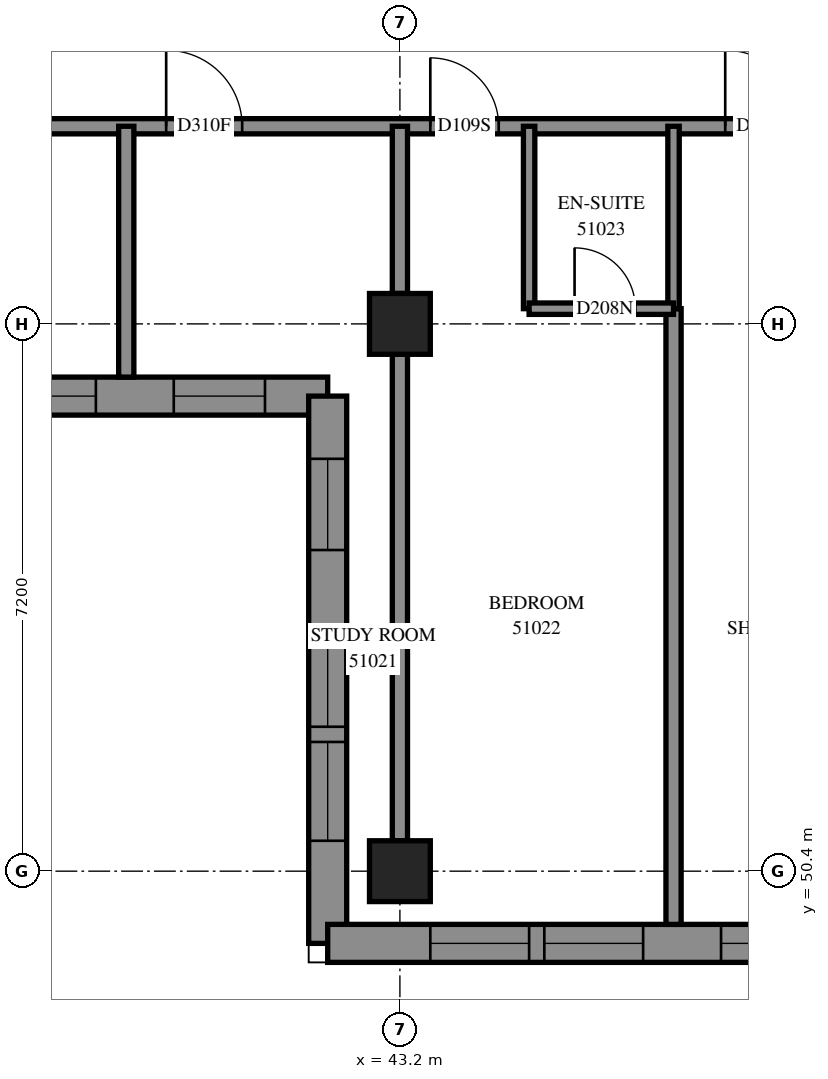
"""IFC4 building model, lengths in metres.
Left out: names, types, materials, properties, quantities, classifications, styles, units other than length and angle.
Written with IfcOpenShell. Run it as: python <this file> out.ifc"""

import sys

from ifc_helpers import new_model, si_unit, direction, frame, frame_2d, origin, origin_2d, place, context, subcontext, project, spatial, polyline, rectangle, outline, extrude, element, fill, save


model = new_model("IFC4")
c1 = context("Model", 3, precision=1e-05, world=origin(), true_north=direction((0.0, 1.0)))
c2 = subcontext(c1, "Body", "Model", "MODEL_VIEW")
j1 = project(units=[si_unit("LENGTHUNIT", "METRE"), si_unit("PLANEANGLEUNIT", "RADIAN")], contexts=[c1])
p1 = place(None, origin())
s1 = spatial("IfcSite", under=j1, at=p1, CompositionType="ELEMENT")
p2 = place(p1, origin())
s2 = spatial("IfcBuilding", under=s1, at=p2, CompositionType="ELEMENT")
p3 = place(p2, frame((0.0, 0.0, 189.6)))
s3 = spatial("IfcBuildingStorey", under=s2, at=p3, CompositionType="ELEMENT", Elevation=189.6)
for number, where, z_axis, x_axis in (
    (1, (43.2, 50.4, 0.0), (0.0, 0.0, 1.0), (1.0, 0.0, 0.0)),
    (2, (43.2, 57.6, 0.0), (0.0, 0.0, 1.0), (1.0, 0.0, 0.0)),
):
    element("IfcColumn", number, at=place(p3, frame(where, z_axis=z_axis, x_axis=x_axis)), inside=s3, PredefinedType="COLUMN", context=c2, shape_type="SweptSolid", body=[
        extrude(rectangle(XDim=0.8, YDim=0.8, at=origin_2d()), origin(), (0.0, 0.0, 1.0), 3.1),
    ])
p4 = place(p3, frame((35.05, 56.65, 0.0), z_axis=(0.0, 0.0, 1.0), x_axis=(1.0, 0.0, 0.0)))
e3 = element("IfcWall", 3, at=p4, inside=s3, PredefinedType="SOLIDWALL", context=c2, shape_type="SweptSolid", body=[
    extrude(outline(polyline([(-0.25, -0.25), (6.95, -0.25), (7.45, 0.25), (0.25, 0.25), (-0.25, -0.25)])), origin(), (0.0, 0.0, 1.0), 3.1),
])
p5 = place(p4, frame((1.35, 0.0, 0.45)))
e4 = element("IfcOpeningElement", 4, at=p5, cuts=e3, PredefinedType="OPENING", context=c2, shape_type="SweptSolid", body=[
    extrude(rectangle(XDim=1.3, YDim=2.5, at=frame_2d((0.65, 1.25))), frame((0.0, 0.26, 0.0), z_axis=(0.0, -1.0, 0.0), x_axis=(1.0, 0.0, 0.0)), (0.0, 0.0, 1.0), 0.52),
])
p6 = place(p4, frame((2.85, 0.0, 0.45)))
e5 = element("IfcOpeningElement", 5, at=p6, cuts=e3, PredefinedType="OPENING", context=c2, shape_type="SweptSolid", body=[
    extrude(rectangle(XDim=1.3, YDim=2.5, at=frame_2d((0.65, 1.25))), frame((0.0, 0.26, 0.0), z_axis=(0.0, -1.0, 0.0), x_axis=(1.0, 0.0, 0.0)), (0.0, 0.0, 1.0), 0.52),
])
p7 = place(p4, frame((5.175, 0.0, 0.45)))
e6 = element("IfcOpeningElement", 6, at=p7, cuts=e3, PredefinedType="OPENING", context=c2, shape_type="SweptSolid", body=[
    extrude(rectangle(XDim=1.2, YDim=2.5, at=frame_2d((0.6, 1.25))), frame((0.0, 0.26, 0.0), z_axis=(0.0, -1.0, 0.0), x_axis=(1.0, 0.0, 0.0)), (0.0, 0.0, 1.0), 0.52),
])
p8 = place(p3, frame((42.25, 56.65, 0.0), z_axis=(0.0, 0.0, 1.0), x_axis=(0.0, -1.0, 0.0)))
e7 = element("IfcWall", 7, at=p8, inside=s3, PredefinedType="SOLIDWALL", context=c2, shape_type="SweptSolid", body=[
    extrude(outline(polyline([(0.25, -0.25), (7.45, -0.25), (6.95, 0.25), (-0.25, 0.25), (0.25, -0.25)])), origin(), (0.0, 0.0, 1.0), 3.1),
])
p9 = place(p8, frame((3.05, 0.0, 0.45)))
e8 = element("IfcOpeningElement", 8, at=p9, cuts=e7, PredefinedType="OPENING", context=c2, shape_type="SweptSolid", body=[
    extrude(rectangle(XDim=1.3, YDim=2.5, at=frame_2d((0.65, 1.25))), frame((0.0, 0.26, 0.0), z_axis=(0.0, -1.0, 0.0), x_axis=(1.0, 0.0, 0.0)), (0.0, 0.0, 1.0), 0.52),
])
p10 = place(p8, frame((4.55, 0.0, 0.45)))
e9 = element("IfcOpeningElement", 9, at=p10, cuts=e7, PredefinedType="OPENING", context=c2, shape_type="SweptSolid", body=[
    extrude(rectangle(XDim=1.3, YDim=2.5, at=frame_2d((0.65, 1.25))), frame((0.0, 0.26, 0.0), z_axis=(0.0, -1.0, 0.0), x_axis=(1.0, 0.0, 0.0)), (0.0, 0.0, 1.0), 0.52),
])
p11 = place(p8, frame((0.825, 0.0, 0.45)))
e10 = element("IfcOpeningElement", 10, at=p11, cuts=e7, PredefinedType="OPENING", context=c2, shape_type="SweptSolid", body=[
    extrude(rectangle(XDim=1.2, YDim=2.5, at=frame_2d((0.6, 1.25))), frame((0.0, 0.26, 0.0), z_axis=(0.0, -1.0, 0.0), x_axis=(1.0, 0.0, 0.0)), (0.0, 0.0, 1.0), 0.52),
])
p12 = place(p3, frame((42.25, 49.45, 0.0), z_axis=(0.0, 0.0, 1.0), x_axis=(1.0, 0.0, 0.0)))
e11 = element("IfcWall", 11, at=p12, inside=s3, PredefinedType="SOLIDWALL", context=c2, shape_type="SweptSolid", body=[
    extrude(outline(polyline([(-0.25, -0.25), (6.95, -0.25), (7.45, 0.25), (0.25, 0.25), (-0.25, -0.25)])), origin(), (0.0, 0.0, 1.0), 3.1),
])
p13 = place(p12, frame((1.35, 0.0, 0.45)))
e12 = element("IfcOpeningElement", 12, at=p13, cuts=e11, PredefinedType="OPENING", context=c2, shape_type="SweptSolid", body=[
    extrude(rectangle(XDim=1.3, YDim=2.5, at=frame_2d((0.65, 1.25))), frame((0.0, 0.26, 0.0), z_axis=(0.0, -1.0, 0.0), x_axis=(1.0, 0.0, 0.0)), (0.0, 0.0, 1.0), 0.52),
])
p14 = place(p12, frame((2.85, 0.0, 0.45)))
e13 = element("IfcOpeningElement", 13, at=p14, cuts=e11, PredefinedType="OPENING", context=c2, shape_type="SweptSolid", body=[
    extrude(rectangle(XDim=1.3, YDim=2.5, at=frame_2d((0.65, 1.25))), frame((0.0, 0.26, 0.0), z_axis=(0.0, -1.0, 0.0), x_axis=(1.0, 0.0, 0.0)), (0.0, 0.0, 1.0), 0.52),
])
p15 = place(p12, frame((5.175, 0.0, 0.45)))
e14 = element("IfcOpeningElement", 14, at=p15, cuts=e11, PredefinedType="OPENING", context=c2, shape_type="SweptSolid", body=[
    extrude(rectangle(XDim=1.2, YDim=2.5, at=frame_2d((0.6, 1.25))), frame((0.0, 0.26, 0.0), z_axis=(0.0, -1.0, 0.0), x_axis=(1.0, 0.0, 0.0)), (0.0, 0.0, 1.0), 0.52),
])
p16 = place(p3, frame((36.0, 60.2, 0.0), z_axis=(0.0, 0.0, 1.0), x_axis=(1.0, 0.0, 0.0)))
e15 = element("IfcWall", 15, at=p16, inside=s3, PredefinedType="PARTITIONING", context=c2, shape_type="SweptSolid", body=[
    extrude(rectangle(XDim=17.0, YDim=0.2, at=frame_2d((8.5, 0.0))), origin(), (0.0, 0.0, 1.0), 3.1),
])
p17 = place(p16, frame((4.125, 0.0, 0.0)))
e16 = element("IfcOpeningElement", 16, at=p17, cuts=e15, PredefinedType="OPENING", context=c2, shape_type="SweptSolid", body=[
    extrude(rectangle(XDim=1.0, YDim=2.1, at=frame_2d((0.5, 1.05))), frame((0.0, 0.11, 0.0), z_axis=(0.0, -1.0, 0.0), x_axis=(1.0, 0.0, 0.0)), (0.0, 0.0, 1.0), 0.22),
])
p18 = place(p16, frame((7.6, 0.0, 0.0)))
e17 = element("IfcOpeningElement", 17, at=p18, cuts=e15, PredefinedType="OPENING", context=c2, shape_type="SweptSolid", body=[
    extrude(rectangle(XDim=0.9, YDim=2.1, at=frame_2d((0.45, 1.05))), frame((0.0, 0.11, 0.0), z_axis=(0.0, -1.0, 0.0), x_axis=(1.0, 0.0, 0.0)), (0.0, 0.0, 1.0), 0.22),
])
p19 = place(p16, frame((11.48, 0.0, 0.0)))
e18 = element("IfcOpeningElement", 18, at=p19, cuts=e15, PredefinedType="OPENING", context=c2, shape_type="SweptSolid", body=[
    extrude(rectangle(XDim=1.0, YDim=2.1, at=frame_2d((0.5, 1.05))), frame((0.0, 0.11, 0.0), z_axis=(0.0, -1.0, 0.0), x_axis=(1.0, 0.0, 0.0)), (0.0, 0.0, 1.0), 0.22),
])
p20 = place(p16, frame((15.805, 0.0, 0.0)))
e19 = element("IfcOpeningElement", 19, at=p20, cuts=e15, PredefinedType="OPENING", context=c2, shape_type="SweptSolid", body=[
    extrude(rectangle(XDim=1.0, YDim=2.1, at=frame_2d((0.5, 1.05))), frame((0.0, 0.11, 0.0), z_axis=(0.0, -1.0, 0.0), x_axis=(1.0, 0.0, 0.0)), (0.0, 0.0, 1.0), 0.22),
])
p21 = place(p3, frame((46.8, 49.7, 0.0), z_axis=(0.0, 0.0, 1.0), x_axis=(0.0, 1.0, 0.0)))
e20 = element("IfcWall", 20, at=p21, inside=s3, PredefinedType="PARTITIONING", context=c2, shape_type="SweptSolid", body=[
    extrude(rectangle(XDim=8.1, YDim=0.2, at=frame_2d((4.05, 0.0))), origin(), (0.0, 0.0, 1.0), 3.1),
])
p22 = place(p3, frame((43.2, 50.8, 0.0), z_axis=(0.0, 0.0, 1.0), x_axis=(0.0, 1.0, 0.0)))
e21 = element("IfcWall", 21, at=p22, inside=s3, PredefinedType="PARTITIONING", context=c2, shape_type="SweptSolid", body=[
    extrude(rectangle(XDim=6.4, YDim=0.2, at=frame_2d((3.2, 0.0))), origin(), (0.0, 0.0, 1.0), 2.6),
])
p23 = place(p3, frame((39.6, 56.9, 0.0), z_axis=(0.0, 0.0, 1.0), x_axis=(0.0, 1.0, 0.0)))
e22 = element("IfcWall", 22, at=p23, inside=s3, PredefinedType="PARTITIONING", context=c2, shape_type="SweptSolid", body=[
    extrude(rectangle(XDim=3.3, YDim=0.2, at=frame_2d((1.65, 0.0))), origin(), (0.0, 0.0, 1.0), 3.1),
])
for number, where, z_axis, x_axis in (
    (23, (44.9, 57.8, 0.0), (0.0, 0.0, 1.0), (0.0, 1.0, 0.0)),
    (24, (46.8, 57.8, 0.0), (0.0, 0.0, 1.0), (0.0, 1.0, 0.0)),
):
    element("IfcWall", number, at=place(p3, frame(where, z_axis=z_axis, x_axis=x_axis)), inside=s3, PredefinedType="PARTITIONING", context=c2, shape_type="SweptSolid", body=[
        extrude(rectangle(XDim=2.4, YDim=0.15, at=frame_2d((1.2, 0.0))), origin(), (0.0, 0.0, 1.0), 3.1),
    ])
p24 = place(p3, frame((43.2, 58.0, 0.0), z_axis=(0.0, 0.0, 1.0), x_axis=(0.0, 1.0, 0.0)))
e25 = element("IfcWall", 25, at=p24, inside=s3, PredefinedType="PARTITIONING", context=c2, shape_type="SweptSolid", body=[
    extrude(rectangle(XDim=2.2, YDim=0.2, at=frame_2d((1.1, 0.0))), origin(), (0.0, 0.0, 1.0), 3.1),
])
p25 = place(p3, frame((44.9, 57.8, 0.0), z_axis=(0.0, 0.0, 1.0), x_axis=(1.0, 0.0, 0.0)))
e26 = element("IfcWall", 26, at=p25, inside=s3, PredefinedType="PARTITIONING", context=c2, shape_type="SweptSolid", body=[
    extrude(rectangle(XDim=1.9, YDim=0.15, at=frame_2d((0.95, 0.0))), origin(), (0.0, 0.0, 1.0), 3.1),
])
p26 = place(p25, frame((0.598, 0.0, 0.0)))
e27 = element("IfcOpeningElement", 27, at=p26, cuts=e26, PredefinedType="OPENING", context=c2, shape_type="SweptSolid", body=[
    extrude(rectangle(XDim=0.8, YDim=2.1, at=frame_2d((0.4, 1.05))), frame((0.0, 0.085, 0.0), z_axis=(0.0, -1.0, 0.0), x_axis=(1.0, 0.0, 0.0)), (0.0, 0.0, 1.0), 0.17),
])
p27 = place(p6, origin())
e28 = element("IfcWindow", 28, at=p27, inside=s3, PartitioningType="SINGLE_PANEL", PredefinedType="WINDOW", context=c2, shape_type="SweptSolid", body=[
    extrude(rectangle(XDim=1.3, YDim=2.5, at=frame_2d((0.65, 1.25))), frame((0.0, 0.18, 0.0), z_axis=(0.0, -1.0, 0.0), x_axis=(1.0, 0.0, 0.0)), (0.0, 0.0, 1.0), 0.06),
])
fill(e5, e28)
p28 = place(p7, origin())
e29 = element("IfcWindow", 29, at=p28, inside=s3, PartitioningType="SINGLE_PANEL", PredefinedType="WINDOW", context=c2, shape_type="SweptSolid", body=[
    extrude(rectangle(XDim=1.2, YDim=2.5, at=frame_2d((0.6, 1.25))), frame((0.0, 0.18, 0.0), z_axis=(0.0, -1.0, 0.0), x_axis=(1.0, 0.0, 0.0)), (0.0, 0.0, 1.0), 0.06),
])
fill(e6, e29)
p29 = place(p9, origin())
e30 = element("IfcWindow", 30, at=p29, inside=s3, PartitioningType="SINGLE_PANEL", PredefinedType="WINDOW", context=c2, shape_type="SweptSolid", body=[
    extrude(rectangle(XDim=1.3, YDim=2.5, at=frame_2d((0.65, 1.25))), frame((0.0, 0.18, 0.0), z_axis=(0.0, -1.0, 0.0), x_axis=(1.0, 0.0, 0.0)), (0.0, 0.0, 1.0), 0.06),
])
fill(e8, e30)
p30 = place(p10, origin())
e31 = element("IfcWindow", 31, at=p30, inside=s3, PartitioningType="SINGLE_PANEL", PredefinedType="WINDOW", context=c2, shape_type="SweptSolid", body=[
    extrude(rectangle(XDim=1.3, YDim=2.5, at=frame_2d((0.65, 1.25))), frame((0.0, 0.18, 0.0), z_axis=(0.0, -1.0, 0.0), x_axis=(1.0, 0.0, 0.0)), (0.0, 0.0, 1.0), 0.06),
])
fill(e9, e31)
p31 = place(p11, origin())
e32 = element("IfcWindow", 32, at=p31, inside=s3, PartitioningType="SINGLE_PANEL", PredefinedType="WINDOW", context=c2, shape_type="SweptSolid", body=[
    extrude(rectangle(XDim=1.2, YDim=2.5, at=frame_2d((0.6, 1.25))), frame((0.0, 0.18, 0.0), z_axis=(0.0, -1.0, 0.0), x_axis=(1.0, 0.0, 0.0)), (0.0, 0.0, 1.0), 0.06),
])
fill(e10, e32)
p32 = place(p13, origin())
e33 = element("IfcWindow", 33, at=p32, inside=s3, PartitioningType="SINGLE_PANEL", PredefinedType="WINDOW", context=c2, shape_type="SweptSolid", body=[
    extrude(rectangle(XDim=1.3, YDim=2.5, at=frame_2d((0.65, 1.25))), frame((0.0, 0.18, 0.0), z_axis=(0.0, -1.0, 0.0), x_axis=(1.0, 0.0, 0.0)), (0.0, 0.0, 1.0), 0.06),
])
fill(e12, e33)
p33 = place(p14, origin())
e34 = element("IfcWindow", 34, at=p33, inside=s3, PartitioningType="SINGLE_PANEL", PredefinedType="WINDOW", context=c2, shape_type="SweptSolid", body=[
    extrude(rectangle(XDim=1.3, YDim=2.5, at=frame_2d((0.65, 1.25))), frame((0.0, 0.18, 0.0), z_axis=(0.0, -1.0, 0.0), x_axis=(1.0, 0.0, 0.0)), (0.0, 0.0, 1.0), 0.06),
])
fill(e13, e34)
p34 = place(p15, origin())
e35 = element("IfcWindow", 35, at=p34, inside=s3, PartitioningType="SINGLE_PANEL", PredefinedType="WINDOW", context=c2, shape_type="SweptSolid", body=[
    extrude(rectangle(XDim=1.2, YDim=2.5, at=frame_2d((0.6, 1.25))), frame((0.0, 0.18, 0.0), z_axis=(0.0, -1.0, 0.0), x_axis=(1.0, 0.0, 0.0)), (0.0, 0.0, 1.0), 0.06),
])
fill(e14, e35)
p35 = place(p17, origin())
e36 = element("IfcDoor", 36, at=p35, inside=s3, OperationType="SINGLE_SWING_RIGHT", PredefinedType="DOOR", context=c2, shape_type="SweptSolid", body=[
    extrude(rectangle(XDim=1.0, YDim=2.1, at=frame_2d((0.5, 1.05))), frame((0.0, 0.025, 0.0), z_axis=(0.0, -1.0, 0.0), x_axis=(1.0, 0.0, 0.0)), (0.0, 0.0, 1.0), 0.05),
])
fill(e16, e36)
p36 = place(p18, origin())
e37 = element("IfcDoor", 37, at=p36, inside=s3, OperationType="SINGLE_SWING_LEFT", PredefinedType="DOOR", context=c2, shape_type="SweptSolid", body=[
    extrude(rectangle(XDim=0.9, YDim=2.1, at=frame_2d((0.45, 1.05))), frame((0.0, 0.025, 0.0), z_axis=(0.0, -1.0, 0.0), x_axis=(1.0, 0.0, 0.0)), (0.0, 0.0, 1.0), 0.05),
])
fill(e17, e37)
p37 = place(p26, origin())
e38 = element("IfcDoor", 38, at=p37, inside=s3, OperationType="SINGLE_SWING_RIGHT", PredefinedType="DOOR", context=c2, shape_type="SweptSolid", body=[
    extrude(rectangle(XDim=0.8, YDim=2.1, at=frame_2d((0.4, 1.05))), frame((0.0, 0.025, 0.0), z_axis=(0.0, -1.0, 0.0), x_axis=(1.0, 0.0, 0.0)), (0.0, 0.0, 1.0), 0.05),
])
fill(e27, e38)
p38 = place(p19, origin())
e39 = element("IfcDoor", 39, at=p38, inside=s3, OperationType="SINGLE_SWING_RIGHT", PredefinedType="DOOR", context=c2, shape_type="SweptSolid", body=[
    extrude(rectangle(XDim=1.0, YDim=2.1, at=frame_2d((0.5, 1.05))), frame((0.0, 0.025, 0.0), z_axis=(0.0, -1.0, 0.0), x_axis=(1.0, 0.0, 0.0)), (0.0, 0.0, 1.0), 0.05),
])
fill(e18, e39)
save(model, sys.argv[1])
